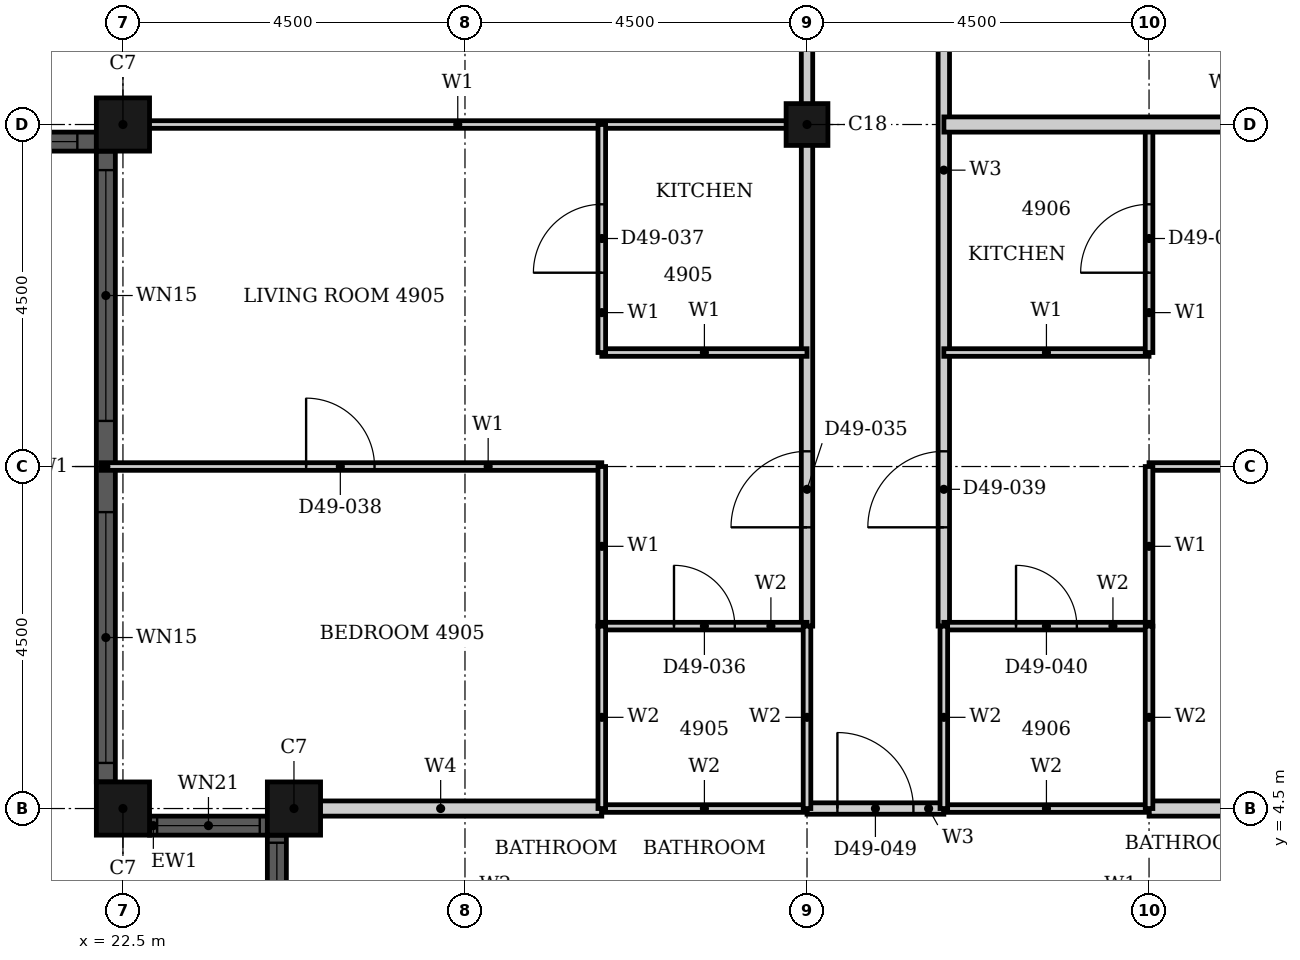
"""IFC4 building model, lengths in metres.
Left out: names, types, materials, properties, quantities, classifications, styles, units other than length and angle.
Written with IfcOpenShell. Run it as: python <this file> out.ifc"""

import sys

from ifc_helpers import new_model, si_unit, direction, frame, frame_2d, origin, origin_2d, place, context, subcontext, project, spatial, rectangle, hollow_rectangle, extrude, element, fill, save


model = new_model("IFC4")
c1 = context("Model", 3, precision=1e-05, world=origin(), true_north=direction((0.0, 1.0)))
c2 = subcontext(c1, "Body", "Model", "MODEL_VIEW")
j1 = project(units=[si_unit("LENGTHUNIT", "METRE"), si_unit("PLANEANGLEUNIT", "RADIAN")], contexts=[c1])
p1 = place(None, origin())
s1 = spatial("IfcSite", under=j1, at=p1, CompositionType="ELEMENT")
p2 = place(p1, origin())
s2 = spatial("IfcBuilding", under=s1, at=p2, CompositionType="ELEMENT")
p3 = place(p2, frame((0.0, 0.0, 196.1)))
s3 = spatial("IfcBuildingStorey", under=s2, at=p3, CompositionType="ELEMENT", Elevation=196.1)
for number, where, z_axis, x_axis in (
    (1, (22.5, 13.5, 0.0), (0.0, 0.0, 1.0), (1.0, 0.0, 0.0)),
    (2, (22.5, 4.5, 0.0), (0.0, 0.0, 1.0), (1.0, 0.0, 0.0)),
    (3, (24.75, 4.5, 0.0), (0.0, 0.0, 1.0), (1.0, 0.0, 0.0)),
):
    element("IfcColumn", number, at=place(p3, frame(where, z_axis=z_axis, x_axis=x_axis)), inside=s3, PredefinedType="COLUMN", context=c2, shape_type="SweptSolid", body=[
        extrude(hollow_rectangle(XDim=0.7, YDim=0.7, WallThickness=0.022, at=origin_2d()), origin(), (0.0, 0.0, 1.0), 3.7),
    ])
p4 = place(p3, frame((31.5, 13.5, 0.0), z_axis=(0.0, 0.0, 1.0), x_axis=(1.0, 0.0, 0.0)))
e4 = element("IfcColumn", 4, at=p4, inside=s3, PredefinedType="COLUMN", context=c2, shape_type="SweptSolid", body=[
    extrude(hollow_rectangle(XDim=0.55, YDim=0.55, WallThickness=0.018, at=origin_2d()), origin(), (0.0, 0.0, 1.0), 3.7),
])
p5 = place(p3, frame((18.35, 13.275, 0.0), z_axis=(0.0, 0.0, 1.0), x_axis=(1.0, 0.0, 0.0)))
e5 = element("IfcWall", 5, at=p5, inside=s3, PredefinedType="SOLIDWALL", context=c2, shape_type="SweptSolid", body=[
    extrude(rectangle(XDim=3.8, YDim=0.25, at=frame_2d((1.9, 0.0))), origin(), (0.0, 0.0, 1.0), 3.7),
])
p6 = place(p5, frame((0.25, 0.0, 0.45)))
e6 = element("IfcOpeningElement", 6, at=p6, cuts=e5, PredefinedType="OPENING", context=c2, shape_type="SweptSolid", body=[
    extrude(rectangle(XDim=3.3, YDim=2.3, at=frame_2d((1.65, 1.15))), frame((0.0, 0.135, 0.0), z_axis=(0.0, -1.0, 0.0), x_axis=(1.0, 0.0, 0.0)), (0.0, 0.0, 1.0), 0.27),
])
p7 = place(p3, frame((22.275, 13.15, 0.0), z_axis=(0.0, 0.0, 1.0), x_axis=(0.0, -1.0, 0.0)))
e7 = element("IfcWall", 7, at=p7, inside=s3, PredefinedType="SOLIDWALL", context=c2, shape_type="SweptSolid", body=[
    extrude(rectangle(XDim=8.3, YDim=0.25, at=frame_2d((4.15, 0.0))), origin(), (0.0, 0.0, 1.0), 3.7),
])
p8 = place(p7, frame((0.25, 0.0, 0.45)))
e8 = element("IfcOpeningElement", 8, at=p8, cuts=e7, PredefinedType="OPENING", context=c2, shape_type="SweptSolid", body=[
    extrude(rectangle(XDim=3.3, YDim=2.3, at=frame_2d((1.65, 1.15))), frame((0.0, 0.135, 0.0), z_axis=(0.0, -1.0, 0.0), x_axis=(1.0, 0.0, 0.0)), (0.0, 0.0, 1.0), 0.27),
])
p9 = place(p7, frame((4.75, 0.0, 0.45)))
e9 = element("IfcOpeningElement", 9, at=p9, cuts=e7, PredefinedType="OPENING", context=c2, shape_type="SweptSolid", body=[
    extrude(rectangle(XDim=3.3, YDim=2.3, at=frame_2d((1.65, 1.15))), frame((0.0, 0.135, 0.0), z_axis=(0.0, -1.0, 0.0), x_axis=(1.0, 0.0, 0.0)), (0.0, 0.0, 1.0), 0.27),
])
p10 = place(p3, frame((22.85, 4.275, 0.0), z_axis=(0.0, 0.0, 1.0), x_axis=(1.0, 0.0, 0.0)))
e10 = element("IfcWall", 10, at=p10, inside=s3, PredefinedType="SOLIDWALL", context=c2, shape_type="SweptSolid", body=[
    extrude(rectangle(XDim=1.55, YDim=0.25, at=frame_2d((0.775, 0.0))), origin(), (0.0, 0.0, 1.0), 3.7),
])
p11 = place(p10, frame((0.1, 0.0, 0.9)))
e11 = element("IfcOpeningElement", 11, at=p11, cuts=e10, PredefinedType="OPENING", context=c2, shape_type="SweptSolid", body=[
    extrude(rectangle(XDim=1.35, YDim=1.85, at=frame_2d((0.675, 0.925))), frame((0.0, 0.135, 0.0), z_axis=(0.0, -1.0, 0.0), x_axis=(1.0, 0.0, 0.0)), (0.0, 0.0, 1.0), 0.27),
])
p12 = place(p3, frame((24.525, 4.15, 0.0), z_axis=(0.0, 0.0, 1.0), x_axis=(0.0, -1.0, 0.0)))
e12 = element("IfcWall", 12, at=p12, inside=s3, PredefinedType="SOLIDWALL", context=c2, shape_type="SweptSolid", body=[
    extrude(rectangle(XDim=1.55, YDim=0.25, at=frame_2d((0.775, 0.0))), origin(), (0.0, 0.0, 1.0), 3.7),
])
p13 = place(p12, frame((0.1, 0.0, 0.9)))
e13 = element("IfcOpeningElement", 13, at=p13, cuts=e12, PredefinedType="OPENING", context=c2, shape_type="SweptSolid", body=[
    extrude(rectangle(XDim=1.35, YDim=1.85, at=frame_2d((0.675, 0.925))), frame((0.0, 0.135, 0.0), z_axis=(0.0, -1.0, 0.0), x_axis=(1.0, 0.0, 0.0)), (0.0, 0.0, 1.0), 0.27),
])
p14 = place(p3, frame((31.5, 4.5, 0.0), z_axis=(0.0, 0.0, 1.0), x_axis=(1.0, 0.0, 0.0)))
e14 = element("IfcWall", 14, at=p14, inside=s3, PredefinedType="PARTITIONING", context=c2, shape_type="SweptSolid", body=[
    extrude(rectangle(XDim=1.8, YDim=0.15, at=frame_2d((0.9, 0.0))), origin(), (0.0, 0.0, 1.0), 3.4),
])
p15 = place(p14, frame((0.4, 0.0, 0.0)))
e15 = element("IfcOpeningElement", 15, at=p15, cuts=e14, PredefinedType="OPENING", context=c2, shape_type="SweptSolid", body=[
    extrude(rectangle(XDim=1.0, YDim=2.2, at=frame_2d((0.5, 1.1))), frame((0.0, 0.085, 0.0), z_axis=(0.0, -1.0, 0.0), x_axis=(1.0, 0.0, 0.0)), (0.0, 0.0, 1.0), 0.17),
])
p16 = place(p3, frame((31.5, 6.9, 0.0), z_axis=(0.0, 0.0, 1.0), x_axis=(0.0, 1.0, 0.0)))
e16 = element("IfcWall", 16, at=p16, inside=s3, PredefinedType="PARTITIONING", context=c2, shape_type="SweptSolid", body=[
    extrude(rectangle(XDim=13.8, YDim=0.15, at=frame_2d((6.9, 0.0))), origin(), (0.0, 0.0, 1.0), 2.68),
])
p17 = place(p16, frame((1.3, 0.0, 0.0)))
e17 = element("IfcOpeningElement", 17, at=p17, cuts=e16, PredefinedType="OPENING", context=c2, shape_type="SweptSolid", body=[
    extrude(rectangle(XDim=1.0, YDim=2.2, at=frame_2d((0.5, 1.1))), frame((0.0, 0.085, 0.0), z_axis=(0.0, -1.0, 0.0), x_axis=(1.0, 0.0, 0.0)), (0.0, 0.0, 1.0), 0.17),
])
p18 = place(p3, frame((33.3, 6.9, 0.0), z_axis=(0.0, 0.0, 1.0), x_axis=(0.0, 1.0, 0.0)))
e18 = element("IfcWall", 18, at=p18, inside=s3, PredefinedType="PARTITIONING", context=c2, shape_type="SweptSolid", body=[
    extrude(rectangle(XDim=13.799, YDim=0.15, at=frame_2d((6.899, 0.0))), origin(), (0.0, 0.0, 1.0), 3.4),
])
p19 = place(p18, frame((9.699, 0.0, 0.0)))
e19 = element("IfcOpeningElement", 19, at=p19, cuts=e18, PredefinedType="OPENING", context=c2, shape_type="SweptSolid", body=[
    extrude(rectangle(XDim=1.0, YDim=2.2, at=frame_2d((0.5, 1.1))), frame((0.0, 0.085, 0.0), z_axis=(0.0, -1.0, 0.0), x_axis=(1.0, 0.0, 0.0)), (0.0, 0.0, 1.0), 0.17),
])
p20 = place(p18, frame((1.3, 0.0, 0.0)))
e20 = element("IfcOpeningElement", 20, at=p20, cuts=e18, PredefinedType="OPENING", context=c2, shape_type="SweptSolid", body=[
    extrude(rectangle(XDim=1.0, YDim=2.2, at=frame_2d((0.5, 1.1))), frame((0.0, 0.085, 0.0), z_axis=(0.0, -1.0, 0.0), x_axis=(1.0, 0.0, 0.0)), (0.0, 0.0, 1.0), 0.17),
])
for number, where, z_axis, x_axis in (
    (21, (33.3, 10.5, 0.0), (0.0, 0.0, 1.0), (1.0, 0.0, 0.0)),
    (22, (28.8, 10.5, 0.0), (0.0, 0.0, 1.0), (1.0, 0.0, 0.0)),
):
    element("IfcWall", number, at=place(p3, frame(where, z_axis=z_axis, x_axis=x_axis)), inside=s3, PredefinedType="PARTITIONING", context=c2, shape_type="SweptSolid", body=[
        extrude(rectangle(XDim=2.7, YDim=0.1, at=frame_2d((1.35, 0.0))), origin(), (0.0, 0.0, 1.0), 3.4),
    ])
p21 = place(p3, frame((22.31, 13.5, 0.0), z_axis=(0.0, 0.0, 1.0), x_axis=(1.0, 0.0, 0.0)))
e23 = element("IfcWall", 23, at=p21, inside=s3, PredefinedType="PARTITIONING", context=c2, shape_type="SweptSolid", body=[
    extrude(rectangle(XDim=9.19, YDim=0.1, at=frame_2d((4.595, 0.0))), origin(), (0.0, 0.0, 1.0), 2.48),
])
p22 = place(p3, frame((36.0, 9.0, 0.0), z_axis=(0.0, 0.0, 1.0), x_axis=(1.0, 0.0, 0.0)))
e24 = element("IfcWall", 24, at=p22, inside=s3, PredefinedType="PARTITIONING", context=c2, shape_type="SweptSolid", body=[
    extrude(rectangle(XDim=4.79, YDim=0.1, at=frame_2d((2.395, 0.0))), origin(), (0.0, 0.0, 1.0), 3.4),
])
p23 = place(p22, frame((1.8, 0.0, 0.0)))
e25 = element("IfcOpeningElement", 25, at=p23, cuts=e24, PredefinedType="OPENING", context=c2, shape_type="SweptSolid", body=[
    extrude(rectangle(XDim=0.9, YDim=2.1, at=frame_2d((0.45, 1.05))), frame((0.0, 0.06, 0.0), z_axis=(0.0, -1.0, 0.0), x_axis=(1.0, 0.0, 0.0)), (0.0, 0.0, 1.0), 0.12),
])
p24 = place(p3, frame((22.21, 9.0, 0.0), z_axis=(0.0, 0.0, 1.0), x_axis=(1.0, 0.0, 0.0)))
e26 = element("IfcWall", 26, at=p24, inside=s3, PredefinedType="PARTITIONING", context=c2, shape_type="SweptSolid", body=[
    extrude(rectangle(XDim=6.59, YDim=0.1, at=frame_2d((3.295, 0.0))), origin(), (0.0, 0.0, 1.0), 3.4),
])
p25 = place(p24, frame((2.7, 0.0, 0.0)))
e27 = element("IfcOpeningElement", 27, at=p25, cuts=e26, PredefinedType="OPENING", context=c2, shape_type="SweptSolid", body=[
    extrude(rectangle(XDim=0.9, YDim=2.1, at=frame_2d((0.45, 1.05))), frame((0.0, 0.06, 0.0), z_axis=(0.0, -1.0, 0.0), x_axis=(1.0, 0.0, 0.0)), (0.0, 0.0, 1.0), 0.12),
])
p26 = place(p3, frame((28.8, 6.9, 0.0), z_axis=(0.0, 0.0, 1.0), x_axis=(0.0, 1.0, 0.0)))
e28 = element("IfcWall", 28, at=p26, inside=s3, PredefinedType="PARTITIONING", context=c2, shape_type="SweptSolid", body=[
    extrude(rectangle(XDim=2.1, YDim=0.1, at=frame_2d((1.05, 0.0))), origin(), (0.0, 0.0, 1.0), 3.4),
])
p27 = place(p3, frame((28.8, 10.5, 0.0), z_axis=(0.0, 0.0, 1.0), x_axis=(0.0, 1.0, 0.0)))
e29 = element("IfcWall", 29, at=p27, inside=s3, PredefinedType="PARTITIONING", context=c2, shape_type="SweptSolid", body=[
    extrude(rectangle(XDim=3.0, YDim=0.1, at=frame_2d((1.5, 0.0))), origin(), (0.0, 0.0, 1.0), 3.4),
])
p28 = place(p27, frame((1.05, 0.0, 0.0)))
e30 = element("IfcOpeningElement", 30, at=p28, cuts=e29, PredefinedType="OPENING", context=c2, shape_type="SweptSolid", body=[
    extrude(rectangle(XDim=0.9, YDim=2.1, at=frame_2d((0.45, 1.05))), frame((0.0, 0.06, 0.0), z_axis=(0.0, -1.0, 0.0), x_axis=(1.0, 0.0, 0.0)), (0.0, 0.0, 1.0), 0.12),
])
p29 = place(p3, frame((36.0, 6.9, 0.0), z_axis=(0.0, 0.0, 1.0), x_axis=(0.0, 1.0, 0.0)))
e31 = element("IfcWall", 31, at=p29, inside=s3, PredefinedType="PARTITIONING", context=c2, shape_type="SweptSolid", body=[
    extrude(rectangle(XDim=2.1, YDim=0.1, at=frame_2d((1.05, 0.0))), origin(), (0.0, 0.0, 1.0), 2.68),
])
p30 = place(p3, frame((36.0, 10.5, 0.0), z_axis=(0.0, 0.0, 1.0), x_axis=(0.0, 1.0, 0.0)))
e32 = element("IfcWall", 32, at=p30, inside=s3, PredefinedType="PARTITIONING", context=c2, shape_type="SweptSolid", body=[
    extrude(rectangle(XDim=3.0, YDim=0.1, at=frame_2d((1.5, 0.0))), origin(), (0.0, 0.0, 1.0), 2.68),
])
p31 = place(p30, frame((1.05, 0.0, 0.0)))
e33 = element("IfcOpeningElement", 33, at=p31, cuts=e32, PredefinedType="OPENING", context=c2, shape_type="SweptSolid", body=[
    extrude(rectangle(XDim=0.9, YDim=2.1, at=frame_2d((0.45, 1.05))), frame((0.0, 0.06, 0.0), z_axis=(0.0, -1.0, 0.0), x_axis=(1.0, 0.0, 0.0)), (0.0, 0.0, 1.0), 0.12),
])
p32 = place(p3, frame((33.301, 13.5, 0.0), z_axis=(0.0, 0.0, 1.0), x_axis=(1.0, 0.0, 0.0)))
e34 = element("IfcWall", 34, at=p32, inside=s3, PredefinedType="PARTITIONING", context=c2, shape_type="SweptSolid", body=[
    extrude(rectangle(XDim=7.389, YDim=0.2, at=frame_2d((3.694, 0.0))), origin(), (0.0, 0.0, 1.0), 2.48),
])
p33 = place(p3, frame((36.0, 4.5, 0.0), z_axis=(0.0, 0.0, 1.0), x_axis=(1.0, 0.0, 0.0)))
e35 = element("IfcWall", 35, at=p33, inside=s3, PredefinedType="PARTITIONING", context=c2, shape_type="SweptSolid", body=[
    extrude(rectangle(XDim=2.44, YDim=0.2, at=frame_2d((1.22, 0.0))), origin(), (0.0, 0.0, 1.0), 3.4),
])
p34 = place(p3, frame((24.56, 4.5, 0.0), z_axis=(0.0, 0.0, 1.0), x_axis=(1.0, 0.0, 0.0)))
e36 = element("IfcWall", 36, at=p34, inside=s3, PredefinedType="PARTITIONING", context=c2, shape_type="SweptSolid", body=[
    extrude(rectangle(XDim=4.24, YDim=0.2, at=frame_2d((2.12, 0.0))), origin(), (0.0, 0.0, 1.0), 3.4),
])
for number, where, z_axis, x_axis in (
    (37, (33.3, 4.5, 0.0), (0.0, 0.0, 1.0), (1.0, 0.0, 0.0)),
    (38, (28.8, 4.5, 0.0), (0.0, 0.0, 1.0), (1.0, 0.0, 0.0)),
):
    element("IfcWall", number, at=place(p3, frame(where, z_axis=z_axis, x_axis=x_axis)), inside=s3, PredefinedType="PARTITIONING", context=c2, shape_type="SweptSolid", body=[
        extrude(rectangle(XDim=2.7, YDim=0.1, at=frame_2d((1.35, 0.0))), origin(), (0.0, 0.0, 1.0), 3.4),
    ])
p35 = place(p3, frame((33.3, 6.9, 0.0), z_axis=(0.0, 0.0, 1.0), x_axis=(1.0, 0.0, 0.0)))
e39 = element("IfcWall", 39, at=p35, inside=s3, PredefinedType="PARTITIONING", context=c2, shape_type="SweptSolid", body=[
    extrude(rectangle(XDim=2.7, YDim=0.1, at=frame_2d((1.35, 0.0))), origin(), (0.0, 0.0, 1.0), 3.4),
])
p36 = place(p35, frame((0.95, 0.0, 0.0)))
e40 = element("IfcOpeningElement", 40, at=p36, cuts=e39, PredefinedType="OPENING", context=c2, shape_type="SweptSolid", body=[
    extrude(rectangle(XDim=0.8, YDim=2.1, at=frame_2d((0.4, 1.05))), frame((0.0, 0.06, 0.0), z_axis=(0.0, -1.0, 0.0), x_axis=(1.0, 0.0, 0.0)), (0.0, 0.0, 1.0), 0.12),
])
p37 = place(p3, frame((28.8, 6.9, 0.0), z_axis=(0.0, 0.0, 1.0), x_axis=(1.0, 0.0, 0.0)))
e41 = element("IfcWall", 41, at=p37, inside=s3, PredefinedType="PARTITIONING", context=c2, shape_type="SweptSolid", body=[
    extrude(rectangle(XDim=2.7, YDim=0.1, at=frame_2d((1.35, 0.0))), origin(), (0.0, 0.0, 1.0), 3.4),
])
p38 = place(p37, frame((0.95, 0.0, 0.0)))
e42 = element("IfcOpeningElement", 42, at=p38, cuts=e41, PredefinedType="OPENING", context=c2, shape_type="SweptSolid", body=[
    extrude(rectangle(XDim=0.8, YDim=2.1, at=frame_2d((0.4, 1.05))), frame((0.0, 0.06, 0.0), z_axis=(0.0, -1.0, 0.0), x_axis=(1.0, 0.0, 0.0)), (0.0, 0.0, 1.0), 0.12),
])
p39 = place(p3, frame((28.8, 4.5, 0.0), z_axis=(0.0, 0.0, 1.0), x_axis=(0.0, 1.0, 0.0)))
e43 = element("IfcWall", 43, at=p39, inside=s3, PredefinedType="PARTITIONING", context=c2, shape_type="SweptSolid", body=[
    extrude(rectangle(XDim=2.4, YDim=0.1, at=frame_2d((1.2, 0.0))), origin(), (0.0, 0.0, 1.0), 3.4),
])
p40 = place(p3, frame((31.5, 4.5, 0.0), z_axis=(0.0, 0.0, 1.0), x_axis=(0.0, 1.0, 0.0)))
e44 = element("IfcWall", 44, at=p40, inside=s3, PredefinedType="PARTITIONING", context=c2, shape_type="SweptSolid", body=[
    extrude(rectangle(XDim=2.4, YDim=0.1, at=frame_2d((1.2, 0.0))), origin(), (0.0, 0.0, 1.0), 2.68),
])
p41 = place(p3, frame((33.3, 4.5, 0.0), z_axis=(0.0, 0.0, 1.0), x_axis=(0.0, 1.0, 0.0)))
e45 = element("IfcWall", 45, at=p41, inside=s3, PredefinedType="PARTITIONING", context=c2, shape_type="SweptSolid", body=[
    extrude(rectangle(XDim=2.4, YDim=0.1, at=frame_2d((1.2, 0.0))), origin(), (0.0, 0.0, 1.0), 3.4),
])
p42 = place(p3, frame((36.0, 4.5, 0.0), z_axis=(0.0, 0.0, 1.0), x_axis=(0.0, 1.0, 0.0)))
e46 = element("IfcWall", 46, at=p42, inside=s3, PredefinedType="PARTITIONING", context=c2, shape_type="SweptSolid", body=[
    extrude(rectangle(XDim=2.4, YDim=0.1, at=frame_2d((1.2, 0.0))), origin(), (0.0, 0.0, 1.0), 2.68),
])
p43 = place(p6, origin())
e47 = element("IfcWindow", 47, at=p43, inside=s3, PartitioningType="SINGLE_PANEL", PredefinedType="WINDOW", context=c2, shape_type="SweptSolid", body=[
    extrude(rectangle(XDim=3.3, YDim=2.3, at=frame_2d((1.65, 1.15))), frame((0.0, 0.03, 0.0), z_axis=(0.0, -1.0, 0.0), x_axis=(1.0, 0.0, 0.0)), (0.0, 0.0, 1.0), 0.06),
])
fill(e6, e47)
p44 = place(p8, origin())
e48 = element("IfcWindow", 48, at=p44, inside=s3, PartitioningType="SINGLE_PANEL", PredefinedType="WINDOW", context=c2, shape_type="SweptSolid", body=[
    extrude(rectangle(XDim=3.3, YDim=2.3, at=frame_2d((1.65, 1.15))), frame((0.0, 0.03, 0.0), z_axis=(0.0, -1.0, 0.0), x_axis=(1.0, 0.0, 0.0)), (0.0, 0.0, 1.0), 0.06),
])
fill(e8, e48)
p45 = place(p9, origin())
e49 = element("IfcWindow", 49, at=p45, inside=s3, PartitioningType="SINGLE_PANEL", PredefinedType="WINDOW", context=c2, shape_type="SweptSolid", body=[
    extrude(rectangle(XDim=3.3, YDim=2.3, at=frame_2d((1.65, 1.15))), frame((0.0, 0.03, 0.0), z_axis=(0.0, -1.0, 0.0), x_axis=(1.0, 0.0, 0.0)), (0.0, 0.0, 1.0), 0.06),
])
fill(e9, e49)
p46 = place(p11, origin())
e50 = element("IfcWindow", 50, at=p46, inside=s3, PartitioningType="SINGLE_PANEL", PredefinedType="WINDOW", context=c2, shape_type="SweptSolid", body=[
    extrude(rectangle(XDim=1.35, YDim=1.85, at=frame_2d((0.675, 0.925))), frame((0.0, 0.03, 0.0), z_axis=(0.0, -1.0, 0.0), x_axis=(1.0, 0.0, 0.0)), (0.0, 0.0, 1.0), 0.06),
])
fill(e11, e50)
p47 = place(p13, origin())
e51 = element("IfcWindow", 51, at=p47, inside=s3, PartitioningType="SINGLE_PANEL", PredefinedType="WINDOW", context=c2, shape_type="SweptSolid", body=[
    extrude(rectangle(XDim=1.35, YDim=1.85, at=frame_2d((0.675, 0.925))), frame((0.0, 0.03, 0.0), z_axis=(0.0, -1.0, 0.0), x_axis=(1.0, 0.0, 0.0)), (0.0, 0.0, 1.0), 0.06),
])
fill(e13, e51)
p48 = place(p17, origin())
e52 = element("IfcDoor", 52, at=p48, inside=s3, OperationType="SINGLE_SWING_RIGHT", PredefinedType="DOOR", context=c2, shape_type="SweptSolid", body=[
    extrude(rectangle(XDim=1.0, YDim=2.2, at=frame_2d((0.5, 1.1))), frame((0.0, 0.025, 0.0), z_axis=(0.0, -1.0, 0.0), x_axis=(1.0, 0.0, 0.0)), (0.0, 0.0, 1.0), 0.05),
])
fill(e17, e52)
p49 = place(p38, origin())
e53 = element("IfcDoor", 53, at=p49, inside=s3, OperationType="SINGLE_SWING_RIGHT", PredefinedType="DOOR", context=c2, shape_type="SweptSolid", body=[
    extrude(rectangle(XDim=0.8, YDim=2.1, at=frame_2d((0.4, 1.05))), frame((0.0, 0.025, 0.0), z_axis=(0.0, -1.0, 0.0), x_axis=(1.0, 0.0, 0.0)), (0.0, 0.0, 1.0), 0.05),
])
fill(e42, e53)
p50 = place(p28, origin())
e54 = element("IfcDoor", 54, at=p50, inside=s3, OperationType="SINGLE_SWING_RIGHT", PredefinedType="DOOR", context=c2, shape_type="SweptSolid", body=[
    extrude(rectangle(XDim=0.9, YDim=2.1, at=frame_2d((0.45, 1.05))), frame((0.0, 0.025, 0.0), z_axis=(0.0, -1.0, 0.0), x_axis=(1.0, 0.0, 0.0)), (0.0, 0.0, 1.0), 0.05),
])
fill(e30, e54)
p51 = place(p25, origin())
e55 = element("IfcDoor", 55, at=p51, inside=s3, OperationType="SINGLE_SWING_RIGHT", PredefinedType="DOOR", context=c2, shape_type="SweptSolid", body=[
    extrude(rectangle(XDim=0.9, YDim=2.1, at=frame_2d((0.45, 1.05))), frame((0.0, 0.025, 0.0), z_axis=(0.0, -1.0, 0.0), x_axis=(1.0, 0.0, 0.0)), (0.0, 0.0, 1.0), 0.05),
])
fill(e27, e55)
p52 = place(p20, origin())
e56 = element("IfcDoor", 56, at=p52, inside=s3, OperationType="SINGLE_SWING_LEFT", PredefinedType="DOOR", context=c2, shape_type="SweptSolid", body=[
    extrude(rectangle(XDim=1.0, YDim=2.2, at=frame_2d((0.5, 1.1))), frame((0.0, 0.025, 0.0), z_axis=(0.0, -1.0, 0.0), x_axis=(1.0, 0.0, 0.0)), (0.0, 0.0, 1.0), 0.05),
])
fill(e20, e56)
p53 = place(p36, origin())
e57 = element("IfcDoor", 57, at=p53, inside=s3, OperationType="SINGLE_SWING_LEFT", PredefinedType="DOOR", context=c2, shape_type="SweptSolid", body=[
    extrude(rectangle(XDim=0.8, YDim=2.1, at=frame_2d((0.4, 1.05))), frame((0.0, 0.025, 0.0), z_axis=(0.0, -1.0, 0.0), x_axis=(1.0, 0.0, 0.0)), (0.0, 0.0, 1.0), 0.05),
])
fill(e40, e57)
p54 = place(p31, origin())
e58 = element("IfcDoor", 58, at=p54, inside=s3, OperationType="SINGLE_SWING_RIGHT", PredefinedType="DOOR", context=c2, shape_type="SweptSolid", body=[
    extrude(rectangle(XDim=0.9, YDim=2.1, at=frame_2d((0.45, 1.05))), frame((0.0, 0.025, 0.0), z_axis=(0.0, -1.0, 0.0), x_axis=(1.0, 0.0, 0.0)), (0.0, 0.0, 1.0), 0.05),
])
fill(e33, e58)
p55 = place(p15, origin())
e59 = element("IfcDoor", 59, at=p55, inside=s3, OperationType="SINGLE_SWING_LEFT", PredefinedType="DOOR", context=c2, shape_type="SweptSolid", body=[
    extrude(rectangle(XDim=1.0, YDim=2.2, at=frame_2d((0.5, 1.1))), frame((0.0, 0.025, 0.0), z_axis=(0.0, -1.0, 0.0), x_axis=(1.0, 0.0, 0.0)), (0.0, 0.0, 1.0), 0.05),
])
fill(e15, e59)
save(model, sys.argv[1])
